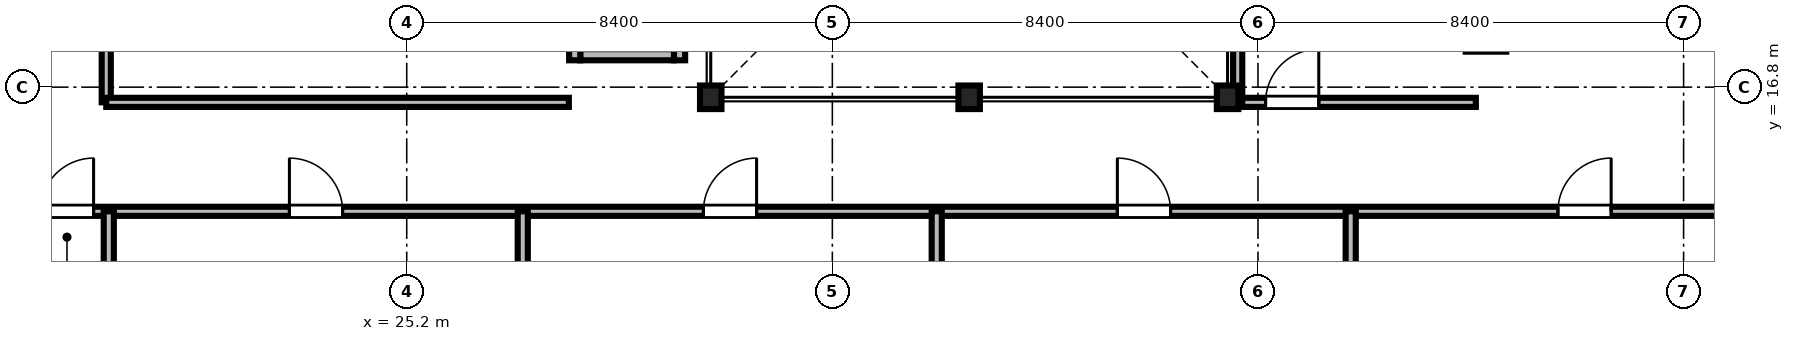
"""IFC4 building model, lengths in metres.
Left out: names, types, materials, properties, quantities, classifications, styles, units other than length and angle.
Written with IfcOpenShell. Run it as: python <this file> out.ifc"""

import sys

from ifc_helpers import new_model, si_unit, direction, frame, frame_2d, origin, origin_2d, place, context, subcontext, project, spatial, rectangle, i_section, extrude, source, transform, mapped, element, fill, save


model = new_model("IFC4")
c1 = context("Model", 3, precision=1e-05, world=origin(), true_north=direction((0.0, 1.0)))
c2 = subcontext(c1, "Body", "Model", "MODEL_VIEW")
j1 = project(units=[si_unit("LENGTHUNIT", "METRE"), si_unit("PLANEANGLEUNIT", "RADIAN")], contexts=[c1])
p1 = place(None, origin())
s1 = spatial("IfcSite", under=j1, at=p1, CompositionType="ELEMENT")
p2 = place(p1, origin())
s2 = spatial("IfcBuilding", under=s1, at=p2, CompositionType="ELEMENT")
p3 = place(p2, frame((0.0, 0.0, 163.1)))
s3 = spatial("IfcBuildingStorey", under=s2, at=p3, CompositionType="ELEMENT", Elevation=163.1)
m1 = source(origin(), c2, "Body", "SweptSolid", [
    extrude(i_section(OverallWidth=0.424, OverallDepth=0.465, WebThickness=0.035, FlangeThickness=0.056, FilletRadius=0.015, at=origin_2d()), origin(), (0.0, 0.0, 1.0), 3.05),
])
for number, where, z_axis, x_axis in (
    (1, (31.2, 16.6, 0.0), (0.0, 0.0, 1.0), (1.0, 0.0, 0.0)),
    (2, (36.3, 16.6, 0.0), (0.0, 0.0, 1.0), (1.0, 0.0, 0.0)),
    (3, (41.4, 16.6, 0.0), (0.0, 0.0, 1.0), (1.0, 0.0, 0.0)),
):
    element("IfcColumn", number, at=place(p3, frame(where, z_axis=z_axis, x_axis=x_axis)), inside=s3, PredefinedType="COLUMN", context=c2, shape_type="MappedRepresentation", body=[
        mapped(m1, transform((0.0, 0.0, 0.0), scale=1.0)),
    ])
m2 = source(origin(), c2, "Body", "SweptSolid", [
    extrude(rectangle(XDim=1.85, YDim=0.22, at=frame_2d((0.925, 0.0))), origin(), (0.0, 0.0, 1.0), 3.05),
])
p4 = place(p3, frame((28.625, 17.44, 0.0), z_axis=(0.0, 0.0, 1.0), x_axis=(1.0, 0.0, 0.0)))
e4 = element("IfcWall", 4, at=p4, inside=s3, PredefinedType="SOLIDWALL", context=c2, shape_type="MappedRepresentation", body=[
    mapped(m2, transform((0.0, 0.0, 0.0), scale=1.0)),
])
m3 = source(origin(), c2, "Body", "SweptSolid", [
    extrude(rectangle(XDim=2.54, YDim=0.22, at=frame_2d((1.27, 0.0))), origin(), (0.0, 0.0, 1.0), 3.05),
])
for number, where, z_axis, x_axis in (
    (5, (28.515, 17.33, 0.0), (0.0, 0.0, 1.0), (0.0, 1.0, 0.0)),
    (6, (30.585, 17.33, 0.0), (0.0, 0.0, 1.0), (0.0, 1.0, 0.0)),
):
    element("IfcWall", number, at=place(p3, frame(where, z_axis=z_axis, x_axis=x_axis)), inside=s3, PredefinedType="SOLIDWALL", context=c2, shape_type="MappedRepresentation", body=[
        mapped(m3, transform((0.0, 0.0, 0.0), scale=1.0)),
    ])
m4 = source(origin(), c2, "Body", "SweptSolid", [
    extrude(rectangle(XDim=46.156, YDim=0.18, at=frame_2d((23.078, 0.0))), origin(), (0.0, 0.0, 1.0), 2.326),
])
p5 = place(p3, frame((6.922, 14.35, 0.0), z_axis=(0.0, 0.0, 1.0), x_axis=(1.0, 0.0, 0.0)))
e7 = element("IfcWall", 7, at=p5, inside=s3, PredefinedType="PARTITIONING", context=c2, shape_type="MappedRepresentation", body=[
    mapped(m4, transform((0.0, 0.0, 0.0), scale=1.0)),
])
m5 = source(origin(), c2, "Body", "SweptSolid", [
    extrude(rectangle(XDim=1.05, YDim=2.2, at=frame_2d((0.525, 1.1))), frame((0.0, 0.1, 0.0), z_axis=(0.0, -1.0, 0.0), x_axis=(1.0, 0.0, 0.0)), (0.0, 0.0, 1.0), 0.2),
])
p6 = place(p5, frame((11.048, 0.0, 0.0)))
e8 = element("IfcOpeningElement", 8, at=p6, cuts=e7, PredefinedType="OPENING", context=c2, shape_type="MappedRepresentation", body=[
    mapped(m5, transform((0.0, 0.0, 0.0), scale=1.0)),
])
p7 = place(p5, frame((15.963, 0.0, 0.0)))
e9 = element("IfcOpeningElement", 9, at=p7, cuts=e7, PredefinedType="OPENING", context=c2, shape_type="MappedRepresentation", body=[
    mapped(m5, transform((0.0, 0.0, 0.0), scale=1.0)),
])
p8 = place(p5, frame((24.133, 0.0, 0.0)))
e10 = element("IfcOpeningElement", 10, at=p8, cuts=e7, PredefinedType="OPENING", context=c2, shape_type="MappedRepresentation", body=[
    mapped(m5, transform((0.0, 0.0, 0.0), scale=1.0)),
])
p9 = place(p5, frame((32.303, 0.0, 0.0)))
e11 = element("IfcOpeningElement", 11, at=p9, cuts=e7, PredefinedType="OPENING", context=c2, shape_type="MappedRepresentation", body=[
    mapped(m5, transform((0.0, 0.0, 0.0), scale=1.0)),
])
p10 = place(p5, frame((40.998, 0.0, 0.0)))
e12 = element("IfcOpeningElement", 12, at=p10, cuts=e7, PredefinedType="OPENING", context=c2, shape_type="MappedRepresentation", body=[
    mapped(m5, transform((0.0, 0.0, 0.0), scale=1.0)),
])
m6 = source(origin(), c2, "Body", "SweptSolid", [
    extrude(rectangle(XDim=11.94, YDim=0.18, at=frame_2d((5.97, 0.0))), origin(), (0.0, 0.0, 1.0), 2.492),
])
p11 = place(p3, frame((19.27, 16.5, 0.0), z_axis=(0.0, 0.0, 1.0), x_axis=(0.0, 1.0, 0.0)))
e13 = element("IfcWall", 13, at=p11, inside=s3, PredefinedType="PARTITIONING", context=c2, shape_type="MappedRepresentation", body=[
    mapped(m6, transform((0.0, 0.0, 0.0), scale=1.0)),
])
p12 = place(p11, frame((4.5, 0.0, 0.0)))
e14 = element("IfcOpeningElement", 14, at=p12, cuts=e13, PredefinedType="OPENING", context=c2, shape_type="MappedRepresentation", body=[
    mapped(m5, transform((0.0, 0.0, 0.0), scale=1.0)),
])
m7 = source(origin(), c2, "Body", "SweptSolid", [
    extrude(rectangle(XDim=4.7, YDim=0.18, at=frame_2d((2.35, 0.0))), origin(), (0.0, 0.0, 1.0), 2.492),
])
p13 = place(p3, frame((41.6, 16.5, 0.0), z_axis=(0.0, 0.0, 1.0), x_axis=(1.0, 0.0, 0.0)))
e15 = element("IfcWall", 15, at=p13, inside=s3, PredefinedType="PARTITIONING", context=c2, shape_type="MappedRepresentation", body=[
    mapped(m7, transform((0.0, 0.0, 0.0), scale=1.0)),
])
p14 = place(p13, frame((0.55, 0.0, 0.0)))
e16 = element("IfcOpeningElement", 16, at=p14, cuts=e15, PredefinedType="OPENING", context=c2, shape_type="MappedRepresentation", body=[
    mapped(m5, transform((0.0, 0.0, 0.0), scale=1.0)),
])
m8 = source(origin(), c2, "Body", "SweptSolid", [
    extrude(rectangle(XDim=12.228, YDim=0.2, at=frame_2d((6.114, 0.0))), origin(), (0.0, 0.0, 1.0), 2.326),
])
p15 = place(p3, frame((19.32, 2.122, 0.0), z_axis=(0.0, 0.0, 1.0), x_axis=(0.0, 1.0, 0.0)))
e17 = element("IfcWall", 17, at=p15, inside=s3, PredefinedType="PARTITIONING", context=c2, shape_type="MappedRepresentation", body=[
    mapped(m8, transform((0.0, 0.0, 0.0), scale=1.0)),
])
m9 = source(origin(), c2, "Body", "SweptSolid", [
    extrude(rectangle(XDim=12.42, YDim=0.2, at=frame_2d((6.21, 0.0))), origin(), (0.0, 0.0, 1.0), 2.326),
])
p16 = place(p3, frame((27.49, 1.93, 0.0), z_axis=(0.0, 0.0, 1.0), x_axis=(0.0, 1.0, 0.0)))
e18 = element("IfcWall", 18, at=p16, inside=s3, PredefinedType="PARTITIONING", context=c2, shape_type="MappedRepresentation", body=[
    mapped(m9, transform((0.0, 0.0, 0.0), scale=1.0)),
])
for number, where, z_axis, x_axis in (
    (19, (35.66, 2.122, 0.0), (0.0, 0.0, 1.0), (0.0, 1.0, 0.0)),
    (20, (43.83, 2.122, 0.0), (0.0, 0.0, 1.0), (0.0, 1.0, 0.0)),
):
    element("IfcWall", number, at=place(p3, frame(where, z_axis=z_axis, x_axis=x_axis)), inside=s3, PredefinedType="PARTITIONING", context=c2, shape_type="MappedRepresentation", body=[
        mapped(m8, transform((0.0, 0.0, 0.0), scale=1.0)),
    ])
m10 = source(origin(), c2, "Body", "SweptSolid", [
    extrude(rectangle(XDim=9.13, YDim=0.18, at=frame_2d((4.565, 0.0))), origin(), (0.0, 0.0, 1.0), 3.05),
])
p17 = place(p3, frame((19.27, 16.5, 0.0), z_axis=(0.0, 0.0, 1.0), x_axis=(1.0, 0.0, 0.0)))
e21 = element("IfcWall", 21, at=p17, inside=s3, PredefinedType="PARTITIONING", context=c2, shape_type="MappedRepresentation", body=[
    mapped(m10, transform((0.0, 0.0, 0.0), scale=1.0)),
])
m11 = source(origin(), c2, "Body", "SweptSolid", [
    extrude(rectangle(XDim=7.15, YDim=0.18, at=frame_2d((3.575, 0.0))), origin(), (0.0, 0.0, 1.0), 2.492),
])
p18 = place(p3, frame((41.6, 16.5, 0.0), z_axis=(0.0, 0.0, 1.0), x_axis=(0.0, 1.0, 0.0)))
e22 = element("IfcWall", 22, at=p18, inside=s3, PredefinedType="PARTITIONING", context=c2, shape_type="MappedRepresentation", body=[
    mapped(m11, transform((0.0, 0.0, 0.0), scale=1.0)),
])
m12 = source(origin(), c2, "Body", "SweptSolid", [
    extrude(rectangle(XDim=1.05, YDim=2.2, at=frame_2d((0.525, 1.1))), frame((0.0, 0.025, 0.0), z_axis=(0.0, -1.0, 0.0), x_axis=(1.0, 0.0, 0.0)), (0.0, 0.0, 1.0), 0.05),
])
p19 = place(p6, origin())
e23 = element("IfcDoor", 23, at=p19, inside=s3, OperationType="SINGLE_SWING_RIGHT", PredefinedType="DOOR", context=c2, shape_type="MappedRepresentation", body=[
    mapped(m12, transform((0.0, 0.0, 0.0), scale=1.0)),
])
fill(e8, e23)
p20 = place(p7, origin())
e24 = element("IfcDoor", 24, at=p20, inside=s3, OperationType="SINGLE_SWING_LEFT", PredefinedType="DOOR", context=c2, shape_type="MappedRepresentation", body=[
    mapped(m12, transform((0.0, 0.0, 0.0), scale=1.0)),
])
fill(e9, e24)
p21 = place(p8, origin())
e25 = element("IfcDoor", 25, at=p21, inside=s3, OperationType="SINGLE_SWING_RIGHT", PredefinedType="DOOR", context=c2, shape_type="MappedRepresentation", body=[
    mapped(m12, transform((0.0, 0.0, 0.0), scale=1.0)),
])
fill(e10, e25)
p22 = place(p9, origin())
e26 = element("IfcDoor", 26, at=p22, inside=s3, OperationType="SINGLE_SWING_LEFT", PredefinedType="DOOR", context=c2, shape_type="MappedRepresentation", body=[
    mapped(m12, transform((0.0, 0.0, 0.0), scale=1.0)),
])
fill(e11, e26)
p23 = place(p10, origin())
e27 = element("IfcDoor", 27, at=p23, inside=s3, OperationType="SINGLE_SWING_RIGHT", PredefinedType="DOOR", context=c2, shape_type="MappedRepresentation", body=[
    mapped(m12, transform((0.0, 0.0, 0.0), scale=1.0)),
])
fill(e12, e27)
p24 = place(p14, origin())
e28 = element("IfcDoor", 28, at=p24, inside=s3, OperationType="SINGLE_SWING_RIGHT", PredefinedType="DOOR", context=c2, shape_type="MappedRepresentation", body=[
    mapped(m12, transform((0.0, 0.0, 0.0), scale=1.0)),
])
fill(e16, e28)
save(model, sys.argv[1])
